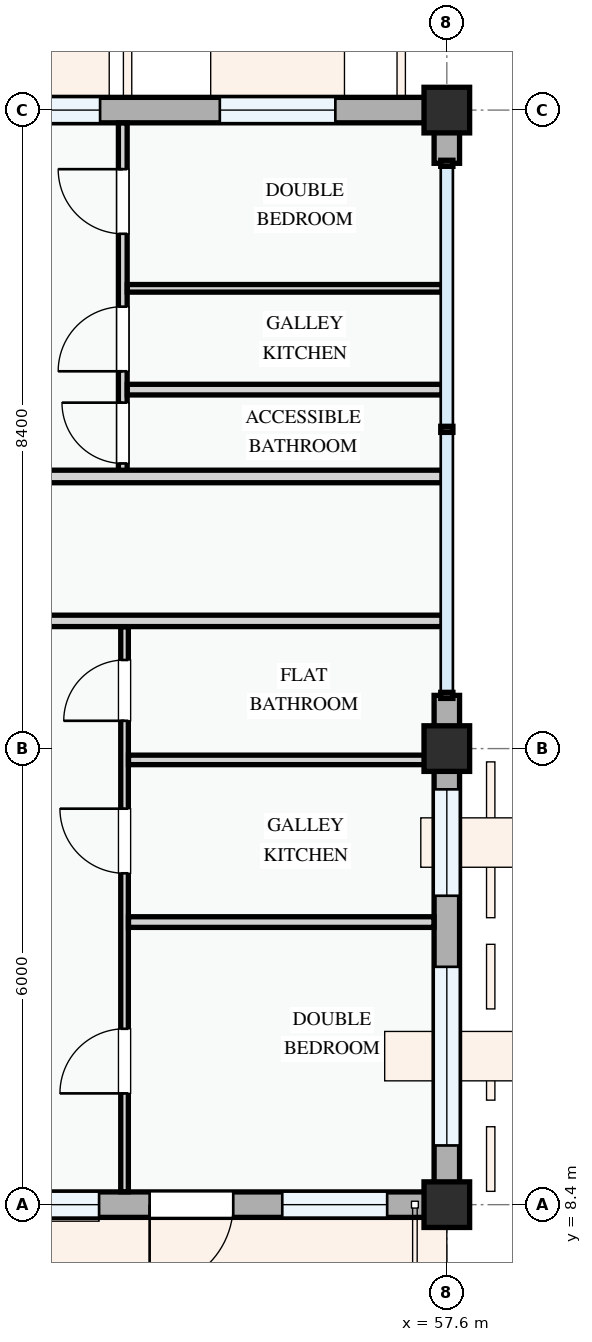
"""IFC4 building model, lengths in metres.
Left out: names, types, materials, properties, quantities, classifications, styles, units other than length and angle.
Written with IfcOpenShell. Run it as: python <this file> out.ifc"""

import sys

from ifc_helpers import new_model, si_unit, direction, frame, frame_2d, origin, origin_2d, place, context, subcontext, project, spatial, rectangle, extrude, element, fill, save


model = new_model("IFC4")
c1 = context("Model", 3, precision=1e-05, world=origin(), true_north=direction((0.0, 1.0)))
c2 = subcontext(c1, "Body", "Model", "MODEL_VIEW")
j1 = project(units=[si_unit("LENGTHUNIT", "METRE"), si_unit("PLANEANGLEUNIT", "RADIAN")], contexts=[c1])
p1 = place(None, origin())
s1 = spatial("IfcSite", under=j1, at=p1, CompositionType="ELEMENT")
p2 = place(p1, origin())
s2 = spatial("IfcBuilding", under=s1, at=p2, CompositionType="ELEMENT")
p3 = place(p2, frame((0.0, 0.0, 11.4)))
s3 = spatial("IfcBuildingStorey", under=s2, at=p3, CompositionType="ELEMENT", Elevation=11.4)
for number, where, z_axis, x_axis in (
    (1, (57.6, 8.4, 0.0), (0.0, 0.0, 1.0), (1.0, 0.0, 0.0)),
    (2, (57.6, 14.4, 0.0), (0.0, 0.0, 1.0), (1.0, 0.0, 0.0)),
    (3, (57.6, 22.8, 0.0), (0.0, 0.0, 1.0), (1.0, 0.0, 0.0)),
):
    element("IfcColumn", number, at=place(p3, frame(where, z_axis=z_axis, x_axis=x_axis)), inside=s3, PredefinedType="COLUMN", context=c2, shape_type="SweptSolid", body=[
        extrude(rectangle(XDim=0.6, YDim=0.6, at=origin_2d()), origin(), (0.0, 0.0, 1.0), 3.3),
    ])
p4 = place(p3, frame((51.6, 8.4, 0.0), z_axis=(0.0, 0.0, 1.0), x_axis=(1.0, 0.0, 0.0)))
e4 = element("IfcWall", 4, at=p4, inside=s3, PredefinedType="STANDARD", context=c2, shape_type="SweptSolid", body=[
    extrude(rectangle(XDim=6.0, YDim=0.335, at=frame_2d((3.0, 0.0))), origin(), (0.0, 0.0, 1.0), 2.475),
])
p5 = place(p4, frame((2.09, 0.0, 0.0)))
e5 = element("IfcOpeningElement", 5, at=p5, cuts=e4, PredefinedType="OPENING", context=c2, shape_type="SweptSolid", body=[
    extrude(rectangle(XDim=1.1, YDim=2.15, at=frame_2d((0.55, 1.075))), frame((0.0, 0.177, 0.0), z_axis=(0.0, -1.0, 0.0), x_axis=(1.0, 0.0, 0.0)), (0.0, 0.0, 1.0), 0.355),
])
p6 = place(p4, frame((0.525, 0.0, 0.78)))
e6 = element("IfcOpeningElement", 6, at=p6, cuts=e4, PredefinedType="OPENING", context=c2, shape_type="SweptSolid", body=[
    extrude(rectangle(XDim=0.9, YDim=1.2, at=frame_2d((0.45, 0.6))), frame((0.0, 0.177, 0.0), z_axis=(0.0, -1.0, 0.0), x_axis=(1.0, 0.0, 0.0)), (0.0, 0.0, 1.0), 0.355),
])
p7 = place(p4, frame((3.835, 0.0, 0.78)))
e7 = element("IfcOpeningElement", 7, at=p7, cuts=e4, PredefinedType="OPENING", context=c2, shape_type="SweptSolid", body=[
    extrude(rectangle(XDim=1.38, YDim=1.48, at=frame_2d((0.69, 0.74))), frame((0.0, 0.177, 0.0), z_axis=(0.0, -1.0, 0.0), x_axis=(1.0, 0.0, 0.0)), (0.0, 0.0, 1.0), 0.355),
])
p8 = place(p3, frame((57.6, 8.4, 0.0), z_axis=(0.0, 0.0, 1.0), x_axis=(0.0, 1.0, 0.0)))
e8 = element("IfcWall", 8, at=p8, inside=s3, PredefinedType="STANDARD", context=c2, shape_type="SweptSolid", body=[
    extrude(rectangle(XDim=6.0, YDim=0.335, at=frame_2d((3.0, 0.0))), origin(), (0.0, 0.0, 1.0), 2.575),
])
p9 = place(p8, frame((0.779, 0.0, 0.78)))
e9 = element("IfcOpeningElement", 9, at=p9, cuts=e8, PredefinedType="OPENING", context=c2, shape_type="SweptSolid", body=[
    extrude(rectangle(XDim=2.35, YDim=1.55, at=frame_2d((1.175, 0.775))), frame((0.0, 0.177, 0.0), z_axis=(0.0, -1.0, 0.0), x_axis=(1.0, 0.0, 0.0)), (0.0, 0.0, 1.0), 0.355),
])
p10 = place(p8, frame((4.064, 0.0, 0.78)))
e10 = element("IfcOpeningElement", 10, at=p10, cuts=e8, PredefinedType="OPENING", context=c2, shape_type="SweptSolid", body=[
    extrude(rectangle(XDim=1.4, YDim=1.45, at=frame_2d((0.7, 0.725))), frame((0.0, 0.177, 0.0), z_axis=(0.0, -1.0, 0.0), x_axis=(1.0, 0.0, 0.0)), (0.0, 0.0, 1.0), 0.355),
])
p11 = place(p3, frame((57.6, 14.4, 0.0), z_axis=(0.0, 0.0, 1.0), x_axis=(0.0, 1.0, 0.0)))
e11 = element("IfcWall", 11, at=p11, inside=s3, PredefinedType="STANDARD", context=c2, shape_type="SweptSolid", body=[
    extrude(rectangle(XDim=0.7, YDim=0.335, at=frame_2d((0.35, 0.0))), origin(), (0.0, 0.0, 1.0), 2.425),
])
p12 = place(p3, frame((57.6, 22.1, 0.0), z_axis=(0.0, 0.0, 1.0), x_axis=(0.0, 1.0, 0.0)))
e12 = element("IfcWall", 12, at=p12, inside=s3, PredefinedType="STANDARD", context=c2, shape_type="SweptSolid", body=[
    extrude(rectangle(XDim=0.531, YDim=0.335, at=frame_2d((0.265, 0.0))), origin(), (0.0, 0.0, 1.0), 2.425),
])
p13 = place(p3, frame((57.6, 22.8, 0.0), z_axis=(0.0, 0.0, 1.0), x_axis=(-1.0, 0.0, 0.0)))
e13 = element("IfcWall", 13, at=p13, inside=s3, PredefinedType="STANDARD", context=c2, shape_type="SweptSolid", body=[
    extrude(rectangle(XDim=6.0, YDim=0.335, at=frame_2d((3.0, 0.0))), origin(), (0.0, 0.0, 1.0), 2.475),
])
p14 = place(p13, frame((1.467, 0.0, 0.78)))
e14 = element("IfcOpeningElement", 14, at=p14, cuts=e13, PredefinedType="OPENING", context=c2, shape_type="SweptSolid", body=[
    extrude(rectangle(XDim=1.52, YDim=1.42, at=frame_2d((0.76, 0.71))), frame((0.0, 0.177, 0.0), z_axis=(0.0, -1.0, 0.0), x_axis=(1.0, 0.0, 0.0)), (0.0, 0.0, 1.0), 0.355),
])
p15 = place(p13, frame((4.562, 0.0, 0.78)))
e15 = element("IfcOpeningElement", 15, at=p15, cuts=e13, PredefinedType="OPENING", context=c2, shape_type="SweptSolid", body=[
    extrude(rectangle(XDim=0.95, YDim=1.15, at=frame_2d((0.475, 0.575))), frame((0.0, 0.177, 0.0), z_axis=(0.0, -1.0, 0.0), x_axis=(1.0, 0.0, 0.0)), (0.0, 0.0, 1.0), 0.355),
])
p16 = place(p3, frame((53.36, 8.57, 0.0), z_axis=(0.0, 0.0, 1.0), x_axis=(0.0, 1.0, 0.0)))
e16 = element("IfcWall", 16, at=p16, inside=s3, PredefinedType="PARTITIONING", context=c2, shape_type="SweptSolid", body=[
    extrude(rectangle(XDim=7.433, YDim=0.1, at=frame_2d((3.717, 0.0))), origin(), (0.0, 0.0, 1.0), 3.0),
])
p17 = place(p16, frame((1.294, 0.0, 0.0)))
e17 = element("IfcOpeningElement", 17, at=p17, cuts=e16, PredefinedType="OPENING", context=c2, shape_type="SweptSolid", body=[
    extrude(rectangle(XDim=0.85, YDim=2.1, at=frame_2d((0.425, 1.05))), frame((0.0, 0.06, 0.0), z_axis=(0.0, -1.0, 0.0), x_axis=(1.0, 0.0, 0.0)), (0.0, 0.0, 1.0), 0.12),
])
p18 = place(p16, frame((4.19, 0.0, 0.0)))
e18 = element("IfcOpeningElement", 18, at=p18, cuts=e16, PredefinedType="OPENING", context=c2, shape_type="SweptSolid", body=[
    extrude(rectangle(XDim=0.85, YDim=2.1, at=frame_2d((0.425, 1.05))), frame((0.0, 0.06, 0.0), z_axis=(0.0, -1.0, 0.0), x_axis=(1.0, 0.0, 0.0)), (0.0, 0.0, 1.0), 0.12),
])
p19 = place(p16, frame((6.196, 0.0, 0.0)))
e19 = element("IfcOpeningElement", 19, at=p19, cuts=e16, PredefinedType="OPENING", context=c2, shape_type="SweptSolid", body=[
    extrude(rectangle(XDim=0.8, YDim=2.1, at=frame_2d((0.4, 1.05))), frame((0.0, 0.06, 0.0), z_axis=(0.0, -1.0, 0.0), x_axis=(1.0, 0.0, 0.0)), (0.0, 0.0, 1.0), 0.12),
])
p20 = place(p3, frame((53.412, 12.118, 0.0), z_axis=(0.0, 0.0, 1.0), x_axis=(1.0, 0.0, 0.0)))
e20 = element("IfcWall", 20, at=p20, inside=s3, PredefinedType="PARTITIONING", context=c2, shape_type="SweptSolid", body=[
    extrude(rectangle(XDim=4.018, YDim=0.14, at=frame_2d((2.009, 0.0))), origin(), (0.0, 0.0, 1.0), 3.0),
])
p21 = place(p3, frame((53.412, 14.251, 0.0), z_axis=(0.0, 0.0, 1.0), x_axis=(1.0, 0.0, 0.0)))
e21 = element("IfcWall", 21, at=p21, inside=s3, PredefinedType="PARTITIONING", context=c2, shape_type="SweptSolid", body=[
    extrude(rectangle(XDim=4.018, YDim=0.125, at=frame_2d((2.009, 0.0))), origin(), (0.0, 0.0, 1.0), 2.475),
])
p22 = place(p3, frame((53.337, 17.98, 0.0), z_axis=(0.0, 0.0, 1.0), x_axis=(0.0, 1.0, 0.0)))
e22 = element("IfcWall", 22, at=p22, inside=s3, PredefinedType="PARTITIONING", context=c2, shape_type="SweptSolid", body=[
    extrude(rectangle(XDim=4.651, YDim=0.115, at=frame_2d((2.325, 0.0))), origin(), (0.0, 0.0, 1.0), 3.0),
])
p23 = place(p22, frame((0.171, 0.0, 0.0)))
e23 = element("IfcOpeningElement", 23, at=p23, cuts=e22, PredefinedType="OPENING", context=c2, shape_type="SweptSolid", body=[
    extrude(rectangle(XDim=0.8, YDim=2.1, at=frame_2d((0.4, 1.05))), frame((0.0, 0.067, 0.0), z_axis=(0.0, -1.0, 0.0), x_axis=(1.0, 0.0, 0.0)), (0.0, 0.0, 1.0), 0.135),
])
p24 = place(p22, frame((1.384, 0.0, 0.0)))
e24 = element("IfcOpeningElement", 24, at=p24, cuts=e22, PredefinedType="OPENING", context=c2, shape_type="SweptSolid", body=[
    extrude(rectangle(XDim=0.85, YDim=2.1, at=frame_2d((0.425, 1.05))), frame((0.0, 0.067, 0.0), z_axis=(0.0, -1.0, 0.0), x_axis=(1.0, 0.0, 0.0)), (0.0, 0.0, 1.0), 0.135),
])
p25 = place(p22, frame((3.193, 0.0, 0.0)))
e25 = element("IfcOpeningElement", 25, at=p25, cuts=e22, PredefinedType="OPENING", context=c2, shape_type="SweptSolid", body=[
    extrude(rectangle(XDim=0.85, YDim=2.1, at=frame_2d((0.425, 1.05))), frame((0.0, 0.067, 0.0), z_axis=(0.0, -1.0, 0.0), x_axis=(1.0, 0.0, 0.0)), (0.0, 0.0, 1.0), 0.135),
])
p26 = place(p3, frame((53.396, 20.455, 0.0), z_axis=(0.0, 0.0, 1.0), x_axis=(1.0, 0.0, 0.0)))
e26 = element("IfcWall", 26, at=p26, inside=s3, PredefinedType="PARTITIONING", context=c2, shape_type="SweptSolid", body=[
    extrude(rectangle(XDim=4.144, YDim=0.1, at=frame_2d((2.072, 0.0))), origin(), (0.0, 0.0, 1.0), 3.0),
])
p27 = place(p3, frame((53.396, 19.122, 0.0), z_axis=(0.0, 0.0, 1.0), x_axis=(1.0, 0.0, 0.0)))
e27 = element("IfcWall", 27, at=p27, inside=s3, PredefinedType="PARTITIONING", context=c2, shape_type="SweptSolid", body=[
    extrude(rectangle(XDim=4.144, YDim=0.14, at=frame_2d((2.072, 0.0))), origin(), (0.0, 0.0, 1.0), 3.0),
])
p28 = place(p3, frame((22.66, 16.08, 0.0), z_axis=(0.0, 0.0, 1.0), x_axis=(1.0, 0.0, 0.0)))
e28 = element("IfcWall", 28, at=p28, inside=s3, PredefinedType="PARTITIONING", context=c2, shape_type="SweptSolid", body=[
    extrude(rectangle(XDim=34.88, YDim=0.15, at=frame_2d((17.44, 0.0))), origin(), (0.0, 0.0, 1.0), 3.0),
])
p29 = place(p28, frame((2.672, 0.0, 0.0)))
e29 = element("IfcOpeningElement", 29, at=p29, cuts=e28, PredefinedType="OPENING", context=c2, shape_type="SweptSolid", body=[
    extrude(rectangle(XDim=0.92, YDim=2.1, at=frame_2d((0.46, 1.05))), frame((0.0, 0.085, 0.0), z_axis=(0.0, -1.0, 0.0), x_axis=(1.0, 0.0, 0.0)), (0.0, 0.0, 1.0), 0.17),
])
p30 = place(p28, frame((16.58, 0.0, 0.0)))
e30 = element("IfcOpeningElement", 30, at=p30, cuts=e28, PredefinedType="OPENING", context=c2, shape_type="SweptSolid", body=[
    extrude(rectangle(XDim=0.92, YDim=2.1, at=frame_2d((0.46, 1.05))), frame((0.0, 0.085, 0.0), z_axis=(0.0, -1.0, 0.0), x_axis=(1.0, 0.0, 0.0)), (0.0, 0.0, 1.0), 0.17),
])
p31 = place(p28, frame((24.315, 0.0, 0.0)))
e31 = element("IfcOpeningElement", 31, at=p31, cuts=e28, PredefinedType="OPENING", context=c2, shape_type="SweptSolid", body=[
    extrude(rectangle(XDim=0.92, YDim=2.1, at=frame_2d((0.46, 1.05))), frame((0.0, 0.085, 0.0), z_axis=(0.0, -1.0, 0.0), x_axis=(1.0, 0.0, 0.0)), (0.0, 0.0, 1.0), 0.17),
])
p32 = place(p3, frame((22.66, 17.98, 0.0), z_axis=(0.0, 0.0, 1.0), x_axis=(1.0, 0.0, 0.0)))
e32 = element("IfcWall", 32, at=p32, inside=s3, PredefinedType="PARTITIONING", context=c2, shape_type="SweptSolid", body=[
    extrude(rectangle(XDim=34.88, YDim=0.165, at=frame_2d((17.44, 0.0))), origin(), (0.0, 0.0, 1.0), 3.0),
])
p33 = place(p32, frame((2.633, 0.0, 0.0)))
e33 = element("IfcOpeningElement", 33, at=p33, cuts=e32, PredefinedType="OPENING", context=c2, shape_type="SweptSolid", body=[
    extrude(rectangle(XDim=0.96, YDim=2.12, at=frame_2d((0.48, 1.06))), frame((0.0, 0.093, 0.0), z_axis=(0.0, -1.0, 0.0), x_axis=(1.0, 0.0, 0.0)), (0.0, 0.0, 1.0), 0.185),
])
p34 = place(p32, frame((16.343, 0.0, 0.0)))
e34 = element("IfcOpeningElement", 34, at=p34, cuts=e32, PredefinedType="OPENING", context=c2, shape_type="SweptSolid", body=[
    extrude(rectangle(XDim=0.92, YDim=2.1, at=frame_2d((0.46, 1.05))), frame((0.0, 0.093, 0.0), z_axis=(0.0, -1.0, 0.0), x_axis=(1.0, 0.0, 0.0)), (0.0, 0.0, 1.0), 0.185),
])
p35 = place(p32, frame((24.313, 0.0, 0.0)))
e35 = element("IfcOpeningElement", 35, at=p35, cuts=e32, PredefinedType="OPENING", context=c2, shape_type="SweptSolid", body=[
    extrude(rectangle(XDim=0.92, YDim=2.1, at=frame_2d((0.46, 1.05))), frame((0.0, 0.093, 0.0), z_axis=(0.0, -1.0, 0.0), x_axis=(1.0, 0.0, 0.0)), (0.0, 0.0, 1.0), 0.185),
])
p36 = place(p5, frame((1.1, 0.0, 0.0), z_axis=(0.0, 0.0, 1.0), x_axis=(-1.0, 0.0, 0.0)))
e36 = element("IfcDoor", 36, at=p36, inside=s3, OperationType="SINGLE_SWING_RIGHT", PredefinedType="DOOR", context=c2, shape_type="SweptSolid", body=[
    extrude(rectangle(XDim=1.1, YDim=2.15, at=frame_2d((0.55, 1.075))), frame((0.0, 0.025, 0.0), z_axis=(0.0, -1.0, 0.0), x_axis=(1.0, 0.0, 0.0)), (0.0, 0.0, 1.0), 0.05),
])
fill(e5, e36)
p37 = place(p6, origin())
e37 = element("IfcWindow", 37, at=p37, inside=s3, PartitioningType="SINGLE_PANEL", PredefinedType="WINDOW", context=c2, shape_type="SweptSolid", body=[
    extrude(rectangle(XDim=0.9, YDim=1.2, at=frame_2d((0.45, 0.6))), frame((0.0, 0.03, 0.0), z_axis=(0.0, -1.0, 0.0), x_axis=(1.0, 0.0, 0.0)), (0.0, 0.0, 1.0), 0.06),
])
fill(e6, e37)
p38 = place(p7, origin())
e38 = element("IfcWindow", 38, at=p38, inside=s3, PartitioningType="SINGLE_PANEL", PredefinedType="WINDOW", context=c2, shape_type="SweptSolid", body=[
    extrude(rectangle(XDim=1.38, YDim=1.48, at=frame_2d((0.69, 0.74))), frame((0.0, 0.03, 0.0), z_axis=(0.0, -1.0, 0.0), x_axis=(1.0, 0.0, 0.0)), (0.0, 0.0, 1.0), 0.06),
])
fill(e7, e38)
p39 = place(p9, origin())
e39 = element("IfcWindow", 39, at=p39, inside=s3, PartitioningType="DOUBLE_PANEL_VERTICAL", PredefinedType="WINDOW", context=c2, shape_type="SweptSolid", body=[
    extrude(rectangle(XDim=2.35, YDim=1.55, at=frame_2d((1.175, 0.775))), frame((0.0, 0.03, 0.0), z_axis=(0.0, -1.0, 0.0), x_axis=(1.0, 0.0, 0.0)), (0.0, 0.0, 1.0), 0.06),
])
fill(e9, e39)
p40 = place(p10, origin())
e40 = element("IfcWindow", 40, at=p40, inside=s3, PartitioningType="SINGLE_PANEL", PredefinedType="WINDOW", context=c2, shape_type="SweptSolid", body=[
    extrude(rectangle(XDim=1.4, YDim=1.45, at=frame_2d((0.7, 0.725))), frame((0.0, 0.03, 0.0), z_axis=(0.0, -1.0, 0.0), x_axis=(1.0, 0.0, 0.0)), (0.0, 0.0, 1.0), 0.06),
])
fill(e10, e40)
p41 = place(p14, origin())
e41 = element("IfcWindow", 41, at=p41, inside=s3, PartitioningType="SINGLE_PANEL", PredefinedType="WINDOW", context=c2, shape_type="SweptSolid", body=[
    extrude(rectangle(XDim=1.52, YDim=1.42, at=frame_2d((0.76, 0.71))), frame((0.0, 0.03, 0.0), z_axis=(0.0, -1.0, 0.0), x_axis=(1.0, 0.0, 0.0)), (0.0, 0.0, 1.0), 0.06),
])
fill(e14, e41)
p42 = place(p15, origin())
e42 = element("IfcWindow", 42, at=p42, inside=s3, PartitioningType="SINGLE_PANEL", PredefinedType="WINDOW", context=c2, shape_type="SweptSolid", body=[
    extrude(rectangle(XDim=0.95, YDim=1.15, at=frame_2d((0.475, 0.575))), frame((0.0, 0.03, 0.0), z_axis=(0.0, -1.0, 0.0), x_axis=(1.0, 0.0, 0.0)), (0.0, 0.0, 1.0), 0.06),
])
fill(e15, e42)
p43 = place(p17, origin())
e43 = element("IfcDoor", 43, at=p43, inside=s3, OperationType="SINGLE_SWING_LEFT", PredefinedType="DOOR", context=c2, shape_type="SweptSolid", body=[
    extrude(rectangle(XDim=0.85, YDim=2.1, at=frame_2d((0.425, 1.05))), frame((0.0, 0.025, 0.0), z_axis=(0.0, -1.0, 0.0), x_axis=(1.0, 0.0, 0.0)), (0.0, 0.0, 1.0), 0.05),
])
fill(e17, e43)
p44 = place(p18, origin())
e44 = element("IfcDoor", 44, at=p44, inside=s3, OperationType="SINGLE_SWING_RIGHT", PredefinedType="DOOR", context=c2, shape_type="SweptSolid", body=[
    extrude(rectangle(XDim=0.85, YDim=2.1, at=frame_2d((0.425, 1.05))), frame((0.0, 0.025, 0.0), z_axis=(0.0, -1.0, 0.0), x_axis=(1.0, 0.0, 0.0)), (0.0, 0.0, 1.0), 0.05),
])
fill(e18, e44)
p45 = place(p19, origin())
e45 = element("IfcDoor", 45, at=p45, inside=s3, OperationType="SINGLE_SWING_LEFT", PredefinedType="DOOR", context=c2, shape_type="SweptSolid", body=[
    extrude(rectangle(XDim=0.8, YDim=2.1, at=frame_2d((0.4, 1.05))), frame((0.0, 0.025, 0.0), z_axis=(0.0, -1.0, 0.0), x_axis=(1.0, 0.0, 0.0)), (0.0, 0.0, 1.0), 0.05),
])
fill(e19, e45)
p46 = place(p23, origin())
e46 = element("IfcDoor", 46, at=p46, inside=s3, OperationType="SINGLE_SWING_RIGHT", PredefinedType="DOOR", context=c2, shape_type="SweptSolid", body=[
    extrude(rectangle(XDim=0.8, YDim=2.1, at=frame_2d((0.4, 1.05))), frame((0.0, 0.025, 0.0), z_axis=(0.0, -1.0, 0.0), x_axis=(1.0, 0.0, 0.0)), (0.0, 0.0, 1.0), 0.05),
])
fill(e23, e46)
p47 = place(p24, origin())
e47 = element("IfcDoor", 47, at=p47, inside=s3, OperationType="SINGLE_SWING_LEFT", PredefinedType="DOOR", context=c2, shape_type="SweptSolid", body=[
    extrude(rectangle(XDim=0.85, YDim=2.1, at=frame_2d((0.425, 1.05))), frame((0.0, 0.025, 0.0), z_axis=(0.0, -1.0, 0.0), x_axis=(1.0, 0.0, 0.0)), (0.0, 0.0, 1.0), 0.05),
])
fill(e24, e47)
p48 = place(p25, origin())
e48 = element("IfcDoor", 48, at=p48, inside=s3, OperationType="SINGLE_SWING_RIGHT", PredefinedType="DOOR", context=c2, shape_type="SweptSolid", body=[
    extrude(rectangle(XDim=0.85, YDim=2.1, at=frame_2d((0.425, 1.05))), frame((0.0, 0.025, 0.0), z_axis=(0.0, -1.0, 0.0), x_axis=(1.0, 0.0, 0.0)), (0.0, 0.0, 1.0), 0.05),
])
fill(e25, e48)
save(model, sys.argv[1])
